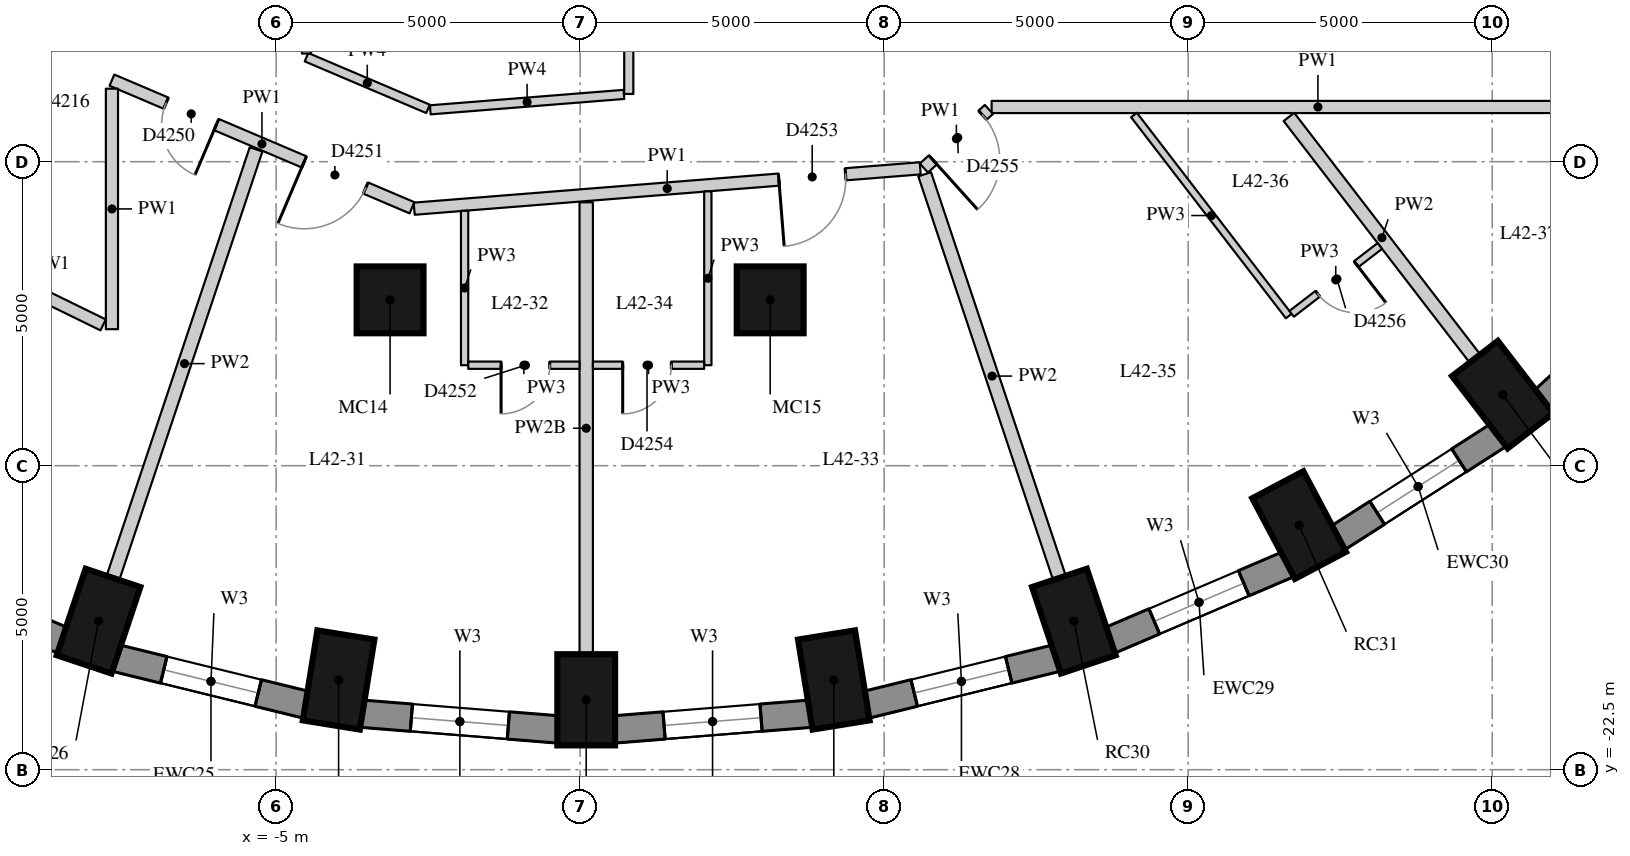
"""IFC4 building model, lengths in metres.
Left out: names, types, materials, properties, quantities, classifications, styles, units other than length and angle.
Written with IfcOpenShell. Run it as: python <this file> out.ifc"""

import sys

from ifc_helpers import new_model, si_unit, direction, frame, frame_2d, origin, origin_2d, place, context, subcontext, project, spatial, rectangle, extrude, element, fill, save


model = new_model("IFC4")
c1 = context("Model", 3, precision=1e-05, world=origin(), true_north=direction((0.0, 1.0)))
c2 = subcontext(c1, "Body", "Model", "MODEL_VIEW")
j1 = project(units=[si_unit("LENGTHUNIT", "METRE"), si_unit("PLANEANGLEUNIT", "RADIAN")], contexts=[c1])
p1 = place(None, origin())
s1 = spatial("IfcSite", under=j1, at=p1, CompositionType="ELEMENT")
p2 = place(p1, origin())
s2 = spatial("IfcBuilding", under=s1, at=p2, CompositionType="ELEMENT")
p3 = place(p2, frame((0.0, 0.0, 151.7)))
s3 = spatial("IfcBuildingStorey", under=s2, at=p3, CompositionType="ELEMENT", Elevation=151.7)
for number, where, z_axis, x_axis in (
    (1, (-7.92, -20.056, 0.0), (0.0, 0.0, 1.0), (-0.317, -0.949, 0.0)),
    (2, (-3.972, -21.024, 0.0), (0.0, 0.0, 1.0), (-0.16, -0.987, 0.0)),
    (3, (0.1, -21.35, 0.0), (0.0, 0.0, 1.0), (0.0, -1.0, 0.0)),
    (4, (4.172, -21.024, 0.0), (0.0, 0.0, 1.0), (0.16, -0.987, 0.0)),
    (5, (8.12, -20.056, 0.0), (0.0, 0.0, 1.0), (0.317, -0.949, 0.0)),
    (6, (11.825, -18.476, 0.0), (0.0, 0.0, 1.0), (0.468, -0.884, 0.0)),
    (7, (15.173, -16.332, 0.0), (0.0, 0.0, 1.0), (0.61, -0.792, 0.0)),
):
    element("IfcColumn", number, at=place(p3, frame(where, z_axis=z_axis, x_axis=x_axis)), inside=s3, PredefinedType="COLUMN", context=c2, shape_type="SweptSolid", body=[
        extrude(rectangle(XDim=1.5, YDim=0.95, at=origin_2d()), origin(), (0.0, 0.0, 1.0), 3.3),
    ])
for number, where, z_axis, x_axis in (
    (8, (-3.126, -14.772, 0.0), (0.0, 0.0, 1.0), (1.0, 0.0, 0.0)),
    (9, (3.126, -14.772, 0.0), (0.0, 0.0, 1.0), (1.0, 0.0, 0.0)),
):
    element("IfcColumn", number, at=place(p3, frame(where, z_axis=z_axis, x_axis=x_axis)), inside=s3, PredefinedType="COLUMN", context=c2, shape_type="SweptSolid", body=[
        extrude(rectangle(XDim=1.1, YDim=1.1, at=origin_2d()), origin(), (0.0, 0.0, 1.0), 3.3),
    ])
p4 = place(p3, frame((-11.45, -19.119, 0.0), z_axis=(0.0, 0.0, 1.0), x_axis=(0.919798725687, -0.392390499663, 0.0)))
e10 = element("IfcWall", 10, at=p4, inside=s3, PredefinedType="SOLIDWALL", context=c2, shape_type="SweptSolid", body=[
    extrude(rectangle(XDim=3.2, YDim=0.45, at=frame_2d((1.6, 0.0))), origin(), (0.0, 0.0, 1.0), 3.02),
])
p5 = place(p4, frame((0.8, 0.0, 0.4)))
e11 = element("IfcOpeningElement", 11, at=p5, cuts=e10, PredefinedType="OPENING", context=c2, shape_type="SweptSolid", body=[
    extrude(rectangle(XDim=1.6, YDim=1.75, at=frame_2d((0.8, 0.875))), frame((0.0, 0.235, 0.0), z_axis=(0.0, -1.0, 0.0), x_axis=(1.0, 0.0, 0.0)), (0.0, 0.0, 1.0), 0.47),
])
p6 = place(p3, frame((-7.643, -20.662, 0.0), z_axis=(0.0, 0.0, 1.0), x_axis=(0.971232901476, -0.238131583563, 0.0)))
e12 = element("IfcWall", 12, at=p6, inside=s3, PredefinedType="SOLIDWALL", context=c2, shape_type="SweptSolid", body=[
    extrude(rectangle(XDim=3.237, YDim=0.45, at=frame_2d((1.618, 0.0))), origin(), (0.0, 0.0, 1.0), 3.02),
])
p7 = place(p6, frame((0.818, 0.0, 0.4)))
e13 = element("IfcOpeningElement", 13, at=p7, cuts=e12, PredefinedType="OPENING", context=c2, shape_type="SweptSolid", body=[
    extrude(rectangle(XDim=1.6, YDim=1.75, at=frame_2d((0.8, 0.875))), frame((0.0, 0.235, 0.0), z_axis=(0.0, -1.0, 0.0), x_axis=(1.0, 0.0, 0.0)), (0.0, 0.0, 1.0), 0.47),
])
p8 = place(p3, frame((-3.601, -21.578, 0.0), z_axis=(0.0, 0.0, 1.0), x_axis=(0.996812416891, -0.079780984773, 0.0)))
e14 = element("IfcWall", 14, at=p8, inside=s3, PredefinedType="SOLIDWALL", context=c2, shape_type="SweptSolid", body=[
    extrude(rectangle(XDim=3.256, YDim=0.45, at=frame_2d((1.628, 0.0))), origin(), (0.0, 0.0, 1.0), 3.02),
])
p9 = place(p8, frame((0.828, 0.0, 0.4)))
e15 = element("IfcOpeningElement", 15, at=p9, cuts=e14, PredefinedType="OPENING", context=c2, shape_type="SweptSolid", body=[
    extrude(rectangle(XDim=1.6, YDim=1.75, at=frame_2d((0.8, 0.875))), frame((0.0, 0.235, 0.0), z_axis=(0.0, -1.0, 0.0), x_axis=(1.0, 0.0, 0.0)), (0.0, 0.0, 1.0), 0.47),
])
p10 = place(p3, frame((0.555, -21.838, 0.0), z_axis=(0.0, 0.0, 1.0), x_axis=(0.996812416891, 0.079780984773, 0.0)))
e16 = element("IfcWall", 16, at=p10, inside=s3, PredefinedType="SOLIDWALL", context=c2, shape_type="SweptSolid", body=[
    extrude(rectangle(XDim=3.256, YDim=0.45, at=frame_2d((1.628, 0.0))), origin(), (0.0, 0.0, 1.0), 3.02),
])
p11 = place(p10, frame((0.828, 0.0, 0.4)))
e17 = element("IfcOpeningElement", 17, at=p11, cuts=e16, PredefinedType="OPENING", context=c2, shape_type="SweptSolid", body=[
    extrude(rectangle(XDim=1.6, YDim=1.75, at=frame_2d((0.8, 0.875))), frame((0.0, 0.235, 0.0), z_axis=(0.0, -1.0, 0.0), x_axis=(1.0, 0.0, 0.0)), (0.0, 0.0, 1.0), 0.47),
])
p12 = place(p3, frame((4.699, -21.433, 0.0), z_axis=(0.0, 0.0, 1.0), x_axis=(0.971237178372, 0.238114139328, 0.0)))
e18 = element("IfcWall", 18, at=p12, inside=s3, PredefinedType="SOLIDWALL", context=c2, shape_type="SweptSolid", body=[
    extrude(rectangle(XDim=3.237, YDim=0.45, at=frame_2d((1.618, 0.0))), origin(), (0.0, 0.0, 1.0), 3.02),
])
p13 = place(p12, frame((0.818, 0.0, 0.4)))
e19 = element("IfcOpeningElement", 19, at=p13, cuts=e18, PredefinedType="OPENING", context=c2, shape_type="SweptSolid", body=[
    extrude(rectangle(XDim=1.6, YDim=1.75, at=frame_2d((0.8, 0.875))), frame((0.0, 0.235, 0.0), z_axis=(0.0, -1.0, 0.0), x_axis=(1.0, 0.0, 0.0)), (0.0, 0.0, 1.0), 0.47),
])
p14 = place(p3, frame((8.706, -20.375, 0.0), z_axis=(0.0, 0.0, 1.0), x_axis=(0.91981046949, 0.392362969986, 0.0)))
e20 = element("IfcWall", 20, at=p14, inside=s3, PredefinedType="SOLIDWALL", context=c2, shape_type="SweptSolid", body=[
    extrude(rectangle(XDim=3.201, YDim=0.45, at=frame_2d((1.6, 0.0))), origin(), (0.0, 0.0, 1.0), 3.02),
])
p15 = place(p14, frame((0.8, 0.0, 0.4)))
e21 = element("IfcOpeningElement", 21, at=p15, cuts=e20, PredefinedType="OPENING", context=c2, shape_type="SweptSolid", body=[
    extrude(rectangle(XDim=1.6, YDim=1.75, at=frame_2d((0.8, 0.875))), frame((0.0, 0.235, 0.0), z_axis=(0.0, -1.0, 0.0), x_axis=(1.0, 0.0, 0.0)), (0.0, 0.0, 1.0), 0.47),
])
p16 = place(p3, frame((12.455, -18.693, 0.0), z_axis=(0.0, 0.0, 1.0), x_axis=(0.842065914439, 0.539374633943, 0.0)))
e22 = element("IfcWall", 22, at=p16, inside=s3, PredefinedType="SOLIDWALL", context=c2, shape_type="SweptSolid", body=[
    extrude(rectangle(XDim=3.151, YDim=0.45, at=frame_2d((1.576, 0.0))), origin(), (0.0, 0.0, 1.0), 3.02),
])
p17 = place(p16, frame((0.776, 0.0, 0.4)))
e23 = element("IfcOpeningElement", 23, at=p17, cuts=e22, PredefinedType="OPENING", context=c2, shape_type="SweptSolid", body=[
    extrude(rectangle(XDim=1.6, YDim=1.75, at=frame_2d((0.8, 0.875))), frame((0.0, 0.235, 0.0), z_axis=(0.0, -1.0, 0.0), x_axis=(1.0, 0.0, 0.0)), (0.0, 0.0, 1.0), 0.47),
])
p18 = place(p3, frame((15.83, -16.439, 0.0), z_axis=(0.0, 0.0, 1.0), x_axis=(0.737808755941, 0.675009807082, 0.0)))
e24 = element("IfcWall", 24, at=p18, inside=s3, PredefinedType="SOLIDWALL", context=c2, shape_type="SweptSolid", body=[
    extrude(rectangle(XDim=3.094, YDim=0.45, at=frame_2d((1.547, 0.0))), origin(), (0.0, 0.0, 1.0), 3.02),
])
p19 = place(p3, frame((17.5, -11.6, 0.0), z_axis=(0.0, 0.0, 1.0), x_axis=(-1.0, 0.0, 0.0)))
e25 = element("IfcWall", 25, at=p19, inside=s3, PredefinedType="PARTITIONING", context=c2, shape_type="SweptSolid", body=[
    extrude(rectangle(XDim=10.732, YDim=0.2, at=frame_2d((5.366, 0.0))), origin(), (0.0, 0.0, 1.0), 3.02),
])
p20 = place(p3, frame((6.723, -11.64, 0.0), z_axis=(0.0, 0.0, 1.0), x_axis=(-0.743032656565, -0.669255161562, 0.0)))
e26 = element("IfcWall", 26, at=p20, inside=s3, PredefinedType="PARTITIONING", context=c2, shape_type="SweptSolid", body=[
    extrude(rectangle(XDim=1.439, YDim=0.2, at=frame_2d((0.72, 0.0))), origin(), (0.0, 0.0, 1.0), 3.02),
])
p21 = place(p20, frame((0.14, 0.0, 0.0)))
e27 = element("IfcOpeningElement", 27, at=p21, cuts=e26, PredefinedType="OPENING", context=c2, shape_type="SweptSolid", body=[
    extrude(rectangle(XDim=1.1, YDim=2.1, at=frame_2d((0.55, 1.05))), frame((0.0, 0.11, 0.0), z_axis=(0.0, -1.0, 0.0), x_axis=(1.0, 0.0, 0.0)), (0.0, 0.0, 1.0), 0.22),
])
p22 = place(p3, frame((5.593, -12.609, 0.0), z_axis=(0.0, 0.0, 1.0), x_axis=(-0.99682930336, -0.079569717626, 0.0)))
e28 = element("IfcWall", 28, at=p22, inside=s3, PredefinedType="PARTITIONING", context=c2, shape_type="SweptSolid", body=[
    extrude(rectangle(XDim=8.349, YDim=0.2, at=frame_2d((4.174, 0.0))), origin(), (0.0, 0.0, 1.0), 3.02),
])
p23 = place(p22, frame((1.232, 0.0, 0.0)))
e29 = element("IfcOpeningElement", 29, at=p23, cuts=e28, PredefinedType="OPENING", context=c2, shape_type="SweptSolid", body=[
    extrude(rectangle(XDim=1.1, YDim=2.1, at=frame_2d((0.55, 1.05))), frame((0.0, 0.11, 0.0), z_axis=(0.0, -1.0, 0.0), x_axis=(1.0, 0.0, 0.0)), (0.0, 0.0, 1.0), 0.22),
])
p24 = place(p3, frame((-2.766, -13.258, 0.0), z_axis=(0.0, 0.0, 1.0), x_axis=(-0.920210819037, 0.391423106787, 0.0)))
e30 = element("IfcWall", 30, at=p24, inside=s3, PredefinedType="PARTITIONING", context=c2, shape_type="SweptSolid", body=[
    extrude(rectangle(XDim=5.362, YDim=0.2, at=frame_2d((2.681, 0.0))), origin(), (0.0, 0.0, 1.0), 3.02),
])
p25 = place(p24, frame((3.495, 0.0, 0.0)))
e31 = element("IfcOpeningElement", 31, at=p25, cuts=e30, PredefinedType="OPENING", context=c2, shape_type="SweptSolid", body=[
    extrude(rectangle(XDim=0.9, YDim=2.1, at=frame_2d((0.45, 1.05))), frame((0.0, 0.11, 0.0), z_axis=(0.0, -1.0, 0.0), x_axis=(1.0, 0.0, 0.0)), (0.0, 0.0, 1.0), 0.22),
])
p26 = place(p24, frame((0.827, 0.0, 0.0)))
e32 = element("IfcOpeningElement", 32, at=p26, cuts=e30, PredefinedType="OPENING", context=c2, shape_type="SweptSolid", body=[
    extrude(rectangle(XDim=1.1, YDim=2.1, at=frame_2d((0.55, 1.05))), frame((0.0, 0.11, 0.0), z_axis=(0.0, -1.0, 0.0), x_axis=(1.0, 0.0, 0.0)), (0.0, 0.0, 1.0), 0.22),
])
p27 = place(p3, frame((-7.7, -11.299, 0.0), z_axis=(0.0, 0.0, 1.0), x_axis=(0.0, -1.0, 0.0)))
e33 = element("IfcWall", 33, at=p27, inside=s3, PredefinedType="PARTITIONING", context=c2, shape_type="SweptSolid", body=[
    extrude(rectangle(XDim=3.956, YDim=0.2, at=frame_2d((1.978, 0.0))), origin(), (0.0, 0.0, 1.0), 3.02),
])
p28 = place(p3, frame((-7.844, -15.185, 0.0), z_axis=(0.0, 0.0, 1.0), x_axis=(-0.898266579534, 0.439450966653, 0.0)))
e34 = element("IfcWall", 34, at=p28, inside=s3, PredefinedType="PARTITIONING", context=c2, shape_type="SweptSolid", body=[
    extrude(rectangle(XDim=2.509, YDim=0.2, at=frame_2d((1.254, 0.0))), origin(), (0.0, 0.0, 1.0), 3.02),
])
p29 = place(p3, frame((0.8, -9.23, 0.0), z_axis=(0.0, 0.0, 1.0), x_axis=(0.0, -1.0, 0.0)))
e35 = element("IfcWall", 35, at=p29, inside=s3, PredefinedType="PARTITIONING", context=c2, shape_type="SweptSolid", body=[
    extrude(rectangle(XDim=2.156, YDim=0.15, at=frame_2d((1.078, 0.0))), origin(), (0.0, 0.0, 1.0), 3.02),
])
p30 = place(p3, frame((0.72, -11.393, 0.0), z_axis=(0.0, 0.0, 1.0), x_axis=(-0.996836626024, -0.079477927865, 0.0)))
e36 = element("IfcWall", 36, at=p30, inside=s3, PredefinedType="PARTITIONING", context=c2, shape_type="SweptSolid", body=[
    extrude(rectangle(XDim=3.195, YDim=0.15, at=frame_2d((1.597, 0.0))), origin(), (0.0, 0.0, 1.0), 3.02),
])
p31 = place(p3, frame((-2.501, -11.631, 0.0), z_axis=(0.0, 0.0, 1.0), x_axis=(-0.920228720371, 0.391381019217, 0.0)))
e37 = element("IfcWall", 37, at=p31, inside=s3, PredefinedType="PARTITIONING", context=c2, shape_type="SweptSolid", body=[
    extrude(rectangle(XDim=2.172, YDim=0.15, at=frame_2d((1.086, 0.0))), origin(), (0.0, 0.0, 1.0), 3.02),
])
p32 = place(p3, frame((-4.5, -10.721, 0.0), z_axis=(0.0, 0.0, 1.0), x_axis=(0.0, 1.0, 0.0)))
e38 = element("IfcWall", 38, at=p32, inside=s3, PredefinedType="PARTITIONING", context=c2, shape_type="SweptSolid", body=[
    extrude(rectangle(XDim=2.859, YDim=0.15, at=frame_2d((1.43, 0.0))), origin(), (0.0, 0.0, 1.0), 3.02),
])
p33 = place(p3, frame((-7.683, -19.345, 0.0), z_axis=(0.0, 0.0, 1.0), x_axis=(0.316720596973, 0.948518878807, 0.0)))
e39 = element("IfcWall", 39, at=p33, inside=s3, PredefinedType="PARTITIONING", context=c2, shape_type="SweptSolid", body=[
    extrude(rectangle(XDim=7.43, YDim=0.22, at=frame_2d((3.715, 0.0))), origin(), (0.0, 0.0, 1.0), 3.02),
])
p34 = place(p3, frame((0.1, -20.6, 0.0), z_axis=(0.0, 0.0, 1.0), x_axis=(0.0, 1.0, 0.0)))
e40 = element("IfcWall", 40, at=p34, inside=s3, PredefinedType="PARTITIONING", context=c2, shape_type="SweptSolid", body=[
    extrude(rectangle(XDim=7.433, YDim=0.22, at=frame_2d((3.716, 0.0))), origin(), (0.0, 0.0, 1.0), 2.57),
])
p35 = place(p3, frame((7.883, -19.345, 0.0), z_axis=(0.0, 0.0, 1.0), x_axis=(-0.31671959997, 0.948519211716, 0.0)))
e41 = element("IfcWall", 41, at=p35, inside=s3, PredefinedType="PARTITIONING", context=c2, shape_type="SweptSolid", body=[
    extrude(rectangle(XDim=6.999, YDim=0.22, at=frame_2d((3.499, 0.0))), origin(), (0.0, 0.0, 1.0), 3.02),
])
p36 = place(p3, frame((14.716, -15.737, 0.0), z_axis=(0.0, 0.0, 1.0), x_axis=(-0.609986007715, 0.792412184657, 0.0)))
e42 = element("IfcWall", 42, at=p36, inside=s3, PredefinedType="PARTITIONING", context=c2, shape_type="SweptSolid", body=[
    extrude(rectangle(XDim=5.015, YDim=0.22, at=frame_2d((2.507, 0.0))), origin(), (0.0, 0.0, 1.0), 3.02),
])
p37 = place(p3, frame((-1.9, -13.307, 0.0), z_axis=(0.0, 0.0, 1.0), x_axis=(0.0, -1.0, 0.0)))
e43 = element("IfcWall", 43, at=p37, inside=s3, PredefinedType="PARTITIONING", context=c2, shape_type="SweptSolid", body=[
    extrude(rectangle(XDim=2.54, YDim=0.12, at=frame_2d((1.27, 0.0))), origin(), (0.0, 0.0, 1.0), 3.02),
])
p38 = place(p3, frame((2.1, -12.988, 0.0), z_axis=(0.0, 0.0, 1.0), x_axis=(0.0, -1.0, 0.0)))
e44 = element("IfcWall", 44, at=p38, inside=s3, PredefinedType="PARTITIONING", context=c2, shape_type="SweptSolid", body=[
    extrude(rectangle(XDim=2.859, YDim=0.12, at=frame_2d((1.43, 0.0))), origin(), (0.0, 0.0, 1.0), 3.02),
])
p39 = place(p3, frame((9.109, -11.732, 0.0), z_axis=(0.0, 0.0, 1.0), x_axis=(0.609996270026, -0.79240428479, 0.0)))
e45 = element("IfcWall", 45, at=p39, inside=s3, PredefinedType="PARTITIONING", context=c2, shape_type="SweptSolid", body=[
    extrude(rectangle(XDim=4.173, YDim=0.12, at=frame_2d((2.087, 0.0))), origin(), (0.0, 0.0, 1.0), 3.02),
])
p40 = place(p3, frame((-1.84, -15.847, 0.0), z_axis=(0.0, 0.0, 1.0), x_axis=(1.0, 0.0, 0.0)))
e46 = element("IfcWall", 46, at=p40, inside=s3, PredefinedType="PARTITIONING", context=c2, shape_type="SweptSolid", body=[
    extrude(rectangle(XDim=1.83, YDim=0.12, at=frame_2d((0.915, 0.0))), origin(), (0.0, 0.0, 1.0), 3.02),
])
p41 = place(p40, frame((0.54, 0.0, 0.0)))
e47 = element("IfcOpeningElement", 47, at=p41, cuts=e46, PredefinedType="OPENING", context=c2, shape_type="SweptSolid", body=[
    extrude(rectangle(XDim=0.8, YDim=2.1, at=frame_2d((0.4, 1.05))), frame((0.0, 0.07, 0.0), z_axis=(0.0, -1.0, 0.0), x_axis=(1.0, 0.0, 0.0)), (0.0, 0.0, 1.0), 0.14),
])
p42 = place(p3, frame((2.04, -15.847, 0.0), z_axis=(0.0, 0.0, 1.0), x_axis=(-1.0, 0.0, 0.0)))
e48 = element("IfcWall", 48, at=p42, inside=s3, PredefinedType="PARTITIONING", context=c2, shape_type="SweptSolid", body=[
    extrude(rectangle(XDim=1.83, YDim=0.12, at=frame_2d((0.915, 0.0))), origin(), (0.0, 0.0, 1.0), 3.02),
])
p43 = place(p42, frame((0.54, 0.0, 0.0)))
e49 = element("IfcOpeningElement", 49, at=p43, cuts=e48, PredefinedType="OPENING", context=c2, shape_type="SweptSolid", body=[
    extrude(rectangle(XDim=0.8, YDim=2.1, at=frame_2d((0.4, 1.05))), frame((0.0, 0.07, 0.0), z_axis=(0.0, -1.0, 0.0), x_axis=(1.0, 0.0, 0.0)), (0.0, 0.0, 1.0), 0.14),
])
p44 = place(p3, frame((11.702, -15.002, 0.0), z_axis=(0.0, 0.0, 1.0), x_axis=(0.792395776304, 0.610007322657, 0.0)))
e50 = element("IfcWall", 50, at=p44, inside=s3, PredefinedType="PARTITIONING", context=c2, shape_type="SweptSolid", body=[
    extrude(rectangle(XDim=1.83, YDim=0.12, at=frame_2d((0.915, 0.0))), origin(), (0.0, 0.0, 1.0), 3.02),
])
p45 = place(p44, frame((0.54, 0.0, 0.0)))
e51 = element("IfcOpeningElement", 51, at=p45, cuts=e50, PredefinedType="OPENING", context=c2, shape_type="SweptSolid", body=[
    extrude(rectangle(XDim=0.8, YDim=2.1, at=frame_2d((0.4, 1.05))), frame((0.0, 0.07, 0.0), z_axis=(0.0, -1.0, 0.0), x_axis=(1.0, 0.0, 0.0)), (0.0, 0.0, 1.0), 0.14),
])
p46 = place(p7, origin())
e52 = element("IfcWindow", 52, at=p46, inside=s3, PartitioningType="SINGLE_PANEL", PredefinedType="WINDOW", context=c2, shape_type="SweptSolid", body=[
    extrude(rectangle(XDim=1.6, YDim=1.75, at=frame_2d((0.8, 0.875))), frame((0.0, 0.035, 0.0), z_axis=(0.0, -1.0, 0.0), x_axis=(1.0, 0.0, 0.0)), (0.0, 0.0, 1.0), 0.06),
])
fill(e13, e52)
p47 = place(p9, origin())
e53 = element("IfcWindow", 53, at=p47, inside=s3, PartitioningType="SINGLE_PANEL", PredefinedType="WINDOW", context=c2, shape_type="SweptSolid", body=[
    extrude(rectangle(XDim=1.6, YDim=1.75, at=frame_2d((0.8, 0.875))), frame((0.0, 0.035, 0.0), z_axis=(0.0, -1.0, 0.0), x_axis=(1.0, 0.0, 0.0)), (0.0, 0.0, 1.0), 0.06),
])
fill(e15, e53)
p48 = place(p11, origin())
e54 = element("IfcWindow", 54, at=p48, inside=s3, PartitioningType="SINGLE_PANEL", PredefinedType="WINDOW", context=c2, shape_type="SweptSolid", body=[
    extrude(rectangle(XDim=1.6, YDim=1.75, at=frame_2d((0.8, 0.875))), frame((0.0, 0.035, 0.0), z_axis=(0.0, -1.0, 0.0), x_axis=(1.0, 0.0, 0.0)), (0.0, 0.0, 1.0), 0.06),
])
fill(e17, e54)
p49 = place(p13, origin())
e55 = element("IfcWindow", 55, at=p49, inside=s3, PartitioningType="SINGLE_PANEL", PredefinedType="WINDOW", context=c2, shape_type="SweptSolid", body=[
    extrude(rectangle(XDim=1.6, YDim=1.75, at=frame_2d((0.8, 0.875))), frame((0.0, 0.035, 0.0), z_axis=(0.0, -1.0, 0.0), x_axis=(1.0, 0.0, 0.0)), (0.0, 0.0, 1.0), 0.06),
])
fill(e19, e55)
p50 = place(p15, origin())
e56 = element("IfcWindow", 56, at=p50, inside=s3, PartitioningType="SINGLE_PANEL", PredefinedType="WINDOW", context=c2, shape_type="SweptSolid", body=[
    extrude(rectangle(XDim=1.6, YDim=1.75, at=frame_2d((0.8, 0.875))), frame((0.0, 0.035, 0.0), z_axis=(0.0, -1.0, 0.0), x_axis=(1.0, 0.0, 0.0)), (0.0, 0.0, 1.0), 0.06),
])
fill(e21, e56)
p51 = place(p17, origin())
e57 = element("IfcWindow", 57, at=p51, inside=s3, PartitioningType="SINGLE_PANEL", PredefinedType="WINDOW", context=c2, shape_type="SweptSolid", body=[
    extrude(rectangle(XDim=1.6, YDim=1.75, at=frame_2d((0.8, 0.875))), frame((0.0, 0.035, 0.0), z_axis=(0.0, -1.0, 0.0), x_axis=(1.0, 0.0, 0.0)), (0.0, 0.0, 1.0), 0.06),
])
fill(e23, e57)
p52 = place(p25, origin())
e58 = element("IfcDoor", 58, at=p52, inside=s3, OperationType="SINGLE_SWING_LEFT", PredefinedType="DOOR", context=c2, shape_type="SweptSolid", body=[
    extrude(rectangle(XDim=0.9, YDim=2.1, at=frame_2d((0.45, 1.05))), frame((0.0, 0.025, 0.0), z_axis=(0.0, -1.0, 0.0), x_axis=(1.0, 0.0, 0.0)), (0.0, 0.0, 1.0), 0.05),
])
fill(e31, e58)
p53 = place(p26, origin())
e59 = element("IfcDoor", 59, at=p53, inside=s3, OperationType="SINGLE_SWING_RIGHT", PredefinedType="DOOR", context=c2, shape_type="SweptSolid", body=[
    extrude(rectangle(XDim=1.1, YDim=2.1, at=frame_2d((0.55, 1.05))), frame((0.0, 0.025, 0.0), z_axis=(0.0, -1.0, 0.0), x_axis=(1.0, 0.0, 0.0)), (0.0, 0.0, 1.0), 0.05),
])
fill(e32, e59)
p54 = place(p41, origin())
e60 = element("IfcDoor", 60, at=p54, inside=s3, OperationType="SINGLE_SWING_RIGHT", PredefinedType="DOOR", context=c2, shape_type="SweptSolid", body=[
    extrude(rectangle(XDim=0.8, YDim=2.1, at=frame_2d((0.4, 1.05))), frame((0.0, 0.025, 0.0), z_axis=(0.0, -1.0, 0.0), x_axis=(1.0, 0.0, 0.0)), (0.0, 0.0, 1.0), 0.05),
])
fill(e47, e60)
p55 = place(p23, origin())
e61 = element("IfcDoor", 61, at=p55, inside=s3, OperationType="SINGLE_SWING_RIGHT", PredefinedType="DOOR", context=c2, shape_type="SweptSolid", body=[
    extrude(rectangle(XDim=1.1, YDim=2.1, at=frame_2d((0.55, 1.05))), frame((0.0, 0.025, 0.0), z_axis=(0.0, -1.0, 0.0), x_axis=(1.0, 0.0, 0.0)), (0.0, 0.0, 1.0), 0.05),
])
fill(e29, e61)
p56 = place(p43, origin())
e62 = element("IfcDoor", 62, at=p56, inside=s3, OperationType="SINGLE_SWING_RIGHT", PredefinedType="DOOR", context=c2, shape_type="SweptSolid", body=[
    extrude(rectangle(XDim=0.8, YDim=2.1, at=frame_2d((0.4, 1.05))), frame((0.0, 0.025, 0.0), z_axis=(0.0, -1.0, 0.0), x_axis=(1.0, 0.0, 0.0)), (0.0, 0.0, 1.0), 0.05),
])
fill(e49, e62)
p57 = place(p21, origin())
e63 = element("IfcDoor", 63, at=p57, inside=s3, OperationType="SINGLE_SWING_RIGHT", PredefinedType="DOOR", context=c2, shape_type="SweptSolid", body=[
    extrude(rectangle(XDim=1.1, YDim=2.1, at=frame_2d((0.55, 1.05))), frame((0.0, 0.025, 0.0), z_axis=(0.0, -1.0, 0.0), x_axis=(1.0, 0.0, 0.0)), (0.0, 0.0, 1.0), 0.05),
])
fill(e27, e63)
p58 = place(p45, origin())
e64 = element("IfcDoor", 64, at=p58, inside=s3, OperationType="SINGLE_SWING_LEFT", PredefinedType="DOOR", context=c2, shape_type="SweptSolid", body=[
    extrude(rectangle(XDim=0.8, YDim=2.1, at=frame_2d((0.4, 1.05))), frame((0.0, 0.025, 0.0), z_axis=(0.0, -1.0, 0.0), x_axis=(1.0, 0.0, 0.0)), (0.0, 0.0, 1.0), 0.05),
])
fill(e51, e64)
save(model, sys.argv[1])
